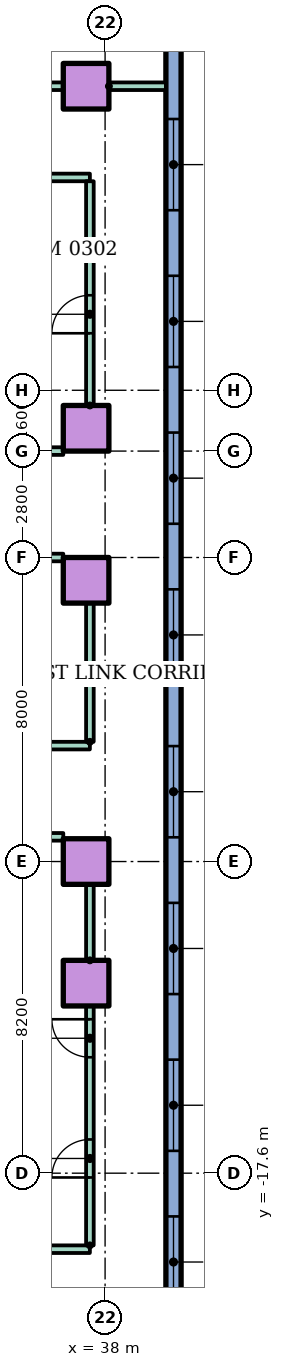
"""IFC4 building model, lengths in metres.
Left out: names, types, materials, properties, quantities, classifications, styles, units other than length and angle.
Written with IfcOpenShell. Run it as: python <this file> out.ifc"""

import sys

from ifc_helpers import new_model, si_unit, direction, frame, frame_2d, origin, origin_2d, place, context, subcontext, project, spatial, rectangle, hollow_rectangle, extrude, element, fill, save


model = new_model("IFC4")
c1 = context("Model", 3, precision=1e-05, world=origin(), true_north=direction((0.0, 1.0)))
c2 = subcontext(c1, "Body", "Model", "MODEL_VIEW")
j1 = project(units=[si_unit("LENGTHUNIT", "METRE"), si_unit("PLANEANGLEUNIT", "RADIAN")], contexts=[c1])
p1 = place(None, origin())
s1 = spatial("IfcSite", under=j1, at=p1, CompositionType="ELEMENT")
p2 = place(p1, origin())
s2 = spatial("IfcBuilding", under=s1, at=p2, CompositionType="ELEMENT")
p3 = place(p2, frame((0.0, 0.0, 14.0)))
s3 = spatial("IfcBuildingStorey", under=s2, at=p3, CompositionType="ELEMENT", Elevation=14.0)
for number, where in (
    (1, (37.5, -12.6, 0.0)),
    (2, (37.5, -9.4, 0.0)),
    (3, (37.5, -2.0, 0.0)),
    (4, (37.5, 2.0, 0.0)),
    (5, (37.5, 11.0, 0.0)),
):
    element("IfcColumn", number, at=place(p3, frame(where)), inside=s3, PredefinedType="COLUMN", context=c2, shape_type="SweptSolid", body=[
        extrude(hollow_rectangle(XDim=1.2, YDim=1.2, WallThickness=0.06, at=origin_2d()), origin(), (0.0, 0.0, 1.0), 4.0),
    ])
p4 = place(p3, frame((39.8, -50.0, 0.0), z_axis=(0.0, 0.0, 1.0), x_axis=(0.0, 1.0, 0.0)))
e6 = element("IfcWall", 6, at=p4, inside=s3, PredefinedType="STANDARD", context=c2, shape_type="SweptSolid", body=[
    extrude(rectangle(XDim=70.0, YDim=0.4, at=frame_2d((35.0, 0.0))), origin(), (0.0, 0.0, 1.0), 3.7),
])
p5 = place(p4, frame((0.75, 0.0, 0.9)))
e7 = element("IfcOpeningElement", 7, at=p5, cuts=e6, PredefinedType="OPENING", context=c2, shape_type="SweptSolid", body=[
    extrude(rectangle(XDim=2.4, YDim=2.1, at=frame_2d((1.2, 1.05))), frame((0.0, 0.21, 0.0), z_axis=(0.0, -1.0, 0.0), x_axis=(1.0, 0.0, 0.0)), (0.0, 0.0, 1.0), 0.42),
])
p6 = place(p4, frame((28.863, 0.0, 0.9)))
e8 = element("IfcOpeningElement", 8, at=p6, cuts=e6, PredefinedType="OPENING", context=c2, shape_type="SweptSolid", body=[
    extrude(rectangle(XDim=2.4, YDim=2.1, at=frame_2d((1.2, 1.05))), frame((0.0, 0.21, 0.0), z_axis=(0.0, -1.0, 0.0), x_axis=(1.0, 0.0, 0.0)), (0.0, 0.0, 1.0), 0.42),
])
p7 = place(p4, frame((32.988, 0.0, 0.9)))
e9 = element("IfcOpeningElement", 9, at=p7, cuts=e6, PredefinedType="OPENING", context=c2, shape_type="SweptSolid", body=[
    extrude(rectangle(XDim=2.4, YDim=2.1, at=frame_2d((1.2, 1.05))), frame((0.0, 0.21, 0.0), z_axis=(0.0, -1.0, 0.0), x_axis=(1.0, 0.0, 0.0)), (0.0, 0.0, 1.0), 0.42),
])
p8 = place(p4, frame((37.113, 0.0, 0.9)))
e10 = element("IfcOpeningElement", 10, at=p8, cuts=e6, PredefinedType="OPENING", context=c2, shape_type="SweptSolid", body=[
    extrude(rectangle(XDim=2.4, YDim=2.1, at=frame_2d((1.2, 1.05))), frame((0.0, 0.21, 0.0), z_axis=(0.0, -1.0, 0.0), x_axis=(1.0, 0.0, 0.0)), (0.0, 0.0, 1.0), 0.42),
])
p9 = place(p4, frame((41.238, 0.0, 0.9)))
e11 = element("IfcOpeningElement", 11, at=p9, cuts=e6, PredefinedType="OPENING", context=c2, shape_type="SweptSolid", body=[
    extrude(rectangle(XDim=2.4, YDim=2.1, at=frame_2d((1.2, 1.05))), frame((0.0, 0.21, 0.0), z_axis=(0.0, -1.0, 0.0), x_axis=(1.0, 0.0, 0.0)), (0.0, 0.0, 1.0), 0.42),
])
p10 = place(p4, frame((45.363, 0.0, 0.9)))
e12 = element("IfcOpeningElement", 12, at=p10, cuts=e6, PredefinedType="OPENING", context=c2, shape_type="SweptSolid", body=[
    extrude(rectangle(XDim=2.4, YDim=2.1, at=frame_2d((1.2, 1.05))), frame((0.0, 0.21, 0.0), z_axis=(0.0, -1.0, 0.0), x_axis=(1.0, 0.0, 0.0)), (0.0, 0.0, 1.0), 0.42),
])
p11 = place(p4, frame((49.488, 0.0, 0.9)))
e13 = element("IfcOpeningElement", 13, at=p11, cuts=e6, PredefinedType="OPENING", context=c2, shape_type="SweptSolid", body=[
    extrude(rectangle(XDim=2.4, YDim=2.1, at=frame_2d((1.2, 1.05))), frame((0.0, 0.21, 0.0), z_axis=(0.0, -1.0, 0.0), x_axis=(1.0, 0.0, 0.0)), (0.0, 0.0, 1.0), 0.42),
])
p12 = place(p4, frame((53.613, 0.0, 0.9)))
e14 = element("IfcOpeningElement", 14, at=p12, cuts=e6, PredefinedType="OPENING", context=c2, shape_type="SweptSolid", body=[
    extrude(rectangle(XDim=2.4, YDim=2.1, at=frame_2d((1.2, 1.05))), frame((0.0, 0.21, 0.0), z_axis=(0.0, -1.0, 0.0), x_axis=(1.0, 0.0, 0.0)), (0.0, 0.0, 1.0), 0.42),
])
p13 = place(p4, frame((57.738, 0.0, 0.9)))
e15 = element("IfcOpeningElement", 15, at=p13, cuts=e6, PredefinedType="OPENING", context=c2, shape_type="SweptSolid", body=[
    extrude(rectangle(XDim=2.4, YDim=2.1, at=frame_2d((1.2, 1.05))), frame((0.0, 0.21, 0.0), z_axis=(0.0, -1.0, 0.0), x_axis=(1.0, 0.0, 0.0)), (0.0, 0.0, 1.0), 0.42),
])
p14 = place(p4, frame((62.05, 0.0, 0.9)))
e16 = element("IfcOpeningElement", 16, at=p14, cuts=e6, PredefinedType="OPENING", context=c2, shape_type="SweptSolid", body=[
    extrude(rectangle(XDim=2.4, YDim=2.1, at=frame_2d((1.2, 1.05))), frame((0.0, 0.21, 0.0), z_axis=(0.0, -1.0, 0.0), x_axis=(1.0, 0.0, 0.0)), (0.0, 0.0, 1.0), 0.42),
])
p15 = place(p4, frame((66.55, 0.0, 0.9)))
e17 = element("IfcOpeningElement", 17, at=p15, cuts=e6, PredefinedType="OPENING", context=c2, shape_type="SweptSolid", body=[
    extrude(rectangle(XDim=2.4, YDim=2.1, at=frame_2d((1.2, 1.05))), frame((0.0, 0.21, 0.0), z_axis=(0.0, -1.0, 0.0), x_axis=(1.0, 0.0, 0.0)), (0.0, 0.0, 1.0), 0.42),
])
p16 = place(p3, frame((-37.6, -19.6, 0.0)))
e18 = element("IfcWall", 18, at=p16, inside=s3, PredefinedType="PARTITIONING", context=c2, shape_type="SweptSolid", body=[
    extrude(rectangle(XDim=75.2, YDim=0.2, at=frame_2d((37.6, 0.0))), origin(), (0.0, 0.0, 1.0), 3.7),
])
p17 = place(p16, frame((2.14, 0.0, 0.0)))
e19 = element("IfcOpeningElement", 19, at=p17, cuts=e18, PredefinedType="OPENING", context=c2, shape_type="SweptSolid", body=[
    extrude(rectangle(XDim=1.0, YDim=2.1, at=frame_2d((0.5, 1.05))), frame((0.0, 0.11, 0.0), z_axis=(0.0, -1.0, 0.0), x_axis=(1.0, 0.0, 0.0)), (0.0, 0.0, 1.0), 0.22),
])
p18 = place(p16, frame((8.86, 0.0, 0.0)))
e20 = element("IfcOpeningElement", 20, at=p18, cuts=e18, PredefinedType="OPENING", context=c2, shape_type="SweptSolid", body=[
    extrude(rectangle(XDim=1.0, YDim=2.1, at=frame_2d((0.5, 1.05))), frame((0.0, 0.11, 0.0), z_axis=(0.0, -1.0, 0.0), x_axis=(1.0, 0.0, 0.0)), (0.0, 0.0, 1.0), 0.22),
])
p19 = place(p16, frame((14.14, 0.0, 0.0)))
e21 = element("IfcOpeningElement", 21, at=p19, cuts=e18, PredefinedType="OPENING", context=c2, shape_type="SweptSolid", body=[
    extrude(rectangle(XDim=1.0, YDim=2.1, at=frame_2d((0.5, 1.05))), frame((0.0, 0.11, 0.0), z_axis=(0.0, -1.0, 0.0), x_axis=(1.0, 0.0, 0.0)), (0.0, 0.0, 1.0), 0.22),
])
p20 = place(p16, frame((20.86, 0.0, 0.0)))
e22 = element("IfcOpeningElement", 22, at=p20, cuts=e18, PredefinedType="OPENING", context=c2, shape_type="SweptSolid", body=[
    extrude(rectangle(XDim=1.0, YDim=2.1, at=frame_2d((0.5, 1.05))), frame((0.0, 0.11, 0.0), z_axis=(0.0, -1.0, 0.0), x_axis=(1.0, 0.0, 0.0)), (0.0, 0.0, 1.0), 0.22),
])
p21 = place(p16, frame((26.14, 0.0, 0.0)))
e23 = element("IfcOpeningElement", 23, at=p21, cuts=e18, PredefinedType="OPENING", context=c2, shape_type="SweptSolid", body=[
    extrude(rectangle(XDim=1.0, YDim=2.1, at=frame_2d((0.5, 1.05))), frame((0.0, 0.11, 0.0), z_axis=(0.0, -1.0, 0.0), x_axis=(1.0, 0.0, 0.0)), (0.0, 0.0, 1.0), 0.22),
])
p22 = place(p16, frame((32.86, 0.0, 0.0)))
e24 = element("IfcOpeningElement", 24, at=p22, cuts=e18, PredefinedType="OPENING", context=c2, shape_type="SweptSolid", body=[
    extrude(rectangle(XDim=1.0, YDim=2.1, at=frame_2d((0.5, 1.05))), frame((0.0, 0.11, 0.0), z_axis=(0.0, -1.0, 0.0), x_axis=(1.0, 0.0, 0.0)), (0.0, 0.0, 1.0), 0.22),
])
p23 = place(p16, frame((39.85, 0.0, 0.0)))
e25 = element("IfcOpeningElement", 25, at=p23, cuts=e18, PredefinedType="OPENING", context=c2, shape_type="SweptSolid", body=[
    extrude(rectangle(XDim=0.9, YDim=2.1, at=frame_2d((0.45, 1.05))), frame((0.0, 0.11, 0.0), z_axis=(0.0, -1.0, 0.0), x_axis=(1.0, 0.0, 0.0)), (0.0, 0.0, 1.0), 0.22),
])
p24 = place(p16, frame((50.1, 0.0, 0.0)))
e26 = element("IfcOpeningElement", 26, at=p24, cuts=e18, PredefinedType="OPENING", context=c2, shape_type="SweptSolid", body=[
    extrude(rectangle(XDim=1.0, YDim=2.1, at=frame_2d((0.5, 1.05))), frame((0.0, 0.11, 0.0), z_axis=(0.0, -1.0, 0.0), x_axis=(1.0, 0.0, 0.0)), (0.0, 0.0, 1.0), 0.22),
])
p25 = place(p16, frame((61.1, 0.0, 0.0)))
e27 = element("IfcOpeningElement", 27, at=p25, cuts=e18, PredefinedType="OPENING", context=c2, shape_type="SweptSolid", body=[
    extrude(rectangle(XDim=1.0, YDim=2.1, at=frame_2d((0.5, 1.05))), frame((0.0, 0.11, 0.0), z_axis=(0.0, -1.0, 0.0), x_axis=(1.0, 0.0, 0.0)), (0.0, 0.0, 1.0), 0.22),
])
p26 = place(p3, frame((-36.9, -8.75, 0.0)))
e28 = element("IfcWall", 28, at=p26, inside=s3, PredefinedType="PARTITIONING", context=c2, shape_type="SweptSolid", body=[
    extrude(rectangle(XDim=73.8, YDim=0.2, at=frame_2d((36.9, 0.0))), origin(), (0.0, 0.0, 1.0), 3.7),
])
p27 = place(p3, frame((-37.6, -6.35, 0.0)))
e29 = element("IfcWall", 29, at=p27, inside=s3, PredefinedType="PARTITIONING", context=c2, shape_type="SweptSolid", body=[
    extrude(rectangle(XDim=75.2, YDim=0.2, at=frame_2d((37.6, 0.0))), origin(), (0.0, 0.0, 1.0), 3.7),
])
p28 = place(p27, frame((4.5, 0.0, 0.0)))
e30 = element("IfcOpeningElement", 30, at=p28, cuts=e29, PredefinedType="OPENING", context=c2, shape_type="SweptSolid", body=[
    extrude(rectangle(XDim=1.0, YDim=2.1, at=frame_2d((0.5, 1.05))), frame((0.0, 0.11, 0.0), z_axis=(0.0, -1.0, 0.0), x_axis=(1.0, 0.0, 0.0)), (0.0, 0.0, 1.0), 0.22),
])
p29 = place(p27, frame((15.5, 0.0, 0.0)))
e31 = element("IfcOpeningElement", 31, at=p29, cuts=e29, PredefinedType="OPENING", context=c2, shape_type="SweptSolid", body=[
    extrude(rectangle(XDim=1.0, YDim=2.1, at=frame_2d((0.5, 1.05))), frame((0.0, 0.11, 0.0), z_axis=(0.0, -1.0, 0.0), x_axis=(1.0, 0.0, 0.0)), (0.0, 0.0, 1.0), 0.22),
])
p30 = place(p27, frame((25.5, 0.0, 0.0)))
e32 = element("IfcOpeningElement", 32, at=p30, cuts=e29, PredefinedType="OPENING", context=c2, shape_type="SweptSolid", body=[
    extrude(rectangle(XDim=1.0, YDim=2.1, at=frame_2d((0.5, 1.05))), frame((0.0, 0.11, 0.0), z_axis=(0.0, -1.0, 0.0), x_axis=(1.0, 0.0, 0.0)), (0.0, 0.0, 1.0), 0.22),
])
p31 = place(p27, frame((34.55, 0.0, 0.0)))
e33 = element("IfcOpeningElement", 33, at=p31, cuts=e29, PredefinedType="OPENING", context=c2, shape_type="SweptSolid", body=[
    extrude(rectangle(XDim=0.9, YDim=2.1, at=frame_2d((0.45, 1.05))), frame((0.0, 0.11, 0.0), z_axis=(0.0, -1.0, 0.0), x_axis=(1.0, 0.0, 0.0)), (0.0, 0.0, 1.0), 0.22),
])
p32 = place(p27, frame((44.604, 0.0, 0.0)))
e34 = element("IfcOpeningElement", 34, at=p32, cuts=e29, PredefinedType="OPENING", context=c2, shape_type="SweptSolid", body=[
    extrude(rectangle(XDim=1.0, YDim=2.1, at=frame_2d((0.5, 1.05))), frame((0.0, 0.11, 0.0), z_axis=(0.0, -1.0, 0.0), x_axis=(1.0, 0.0, 0.0)), (0.0, 0.0, 1.0), 0.22),
])
p33 = place(p27, frame((57.596, 0.0, 0.0)))
e35 = element("IfcOpeningElement", 35, at=p33, cuts=e29, PredefinedType="OPENING", context=c2, shape_type="SweptSolid", body=[
    extrude(rectangle(XDim=1.0, YDim=2.1, at=frame_2d((0.5, 1.05))), frame((0.0, 0.11, 0.0), z_axis=(0.0, -1.0, 0.0), x_axis=(1.0, 0.0, 0.0)), (0.0, 0.0, 1.0), 0.22),
])
p34 = place(p27, frame((68.7, 0.0, 0.0)))
e36 = element("IfcOpeningElement", 36, at=p34, cuts=e29, PredefinedType="OPENING", context=c2, shape_type="SweptSolid", body=[
    extrude(rectangle(XDim=1.0, YDim=2.1, at=frame_2d((0.5, 1.05))), frame((0.0, 0.11, 0.0), z_axis=(0.0, -1.0, 0.0), x_axis=(1.0, 0.0, 0.0)), (0.0, 0.0, 1.0), 0.22),
])
p35 = place(p3, frame((14.0, -1.4, 0.0)))
e37 = element("IfcWall", 37, at=p35, inside=s3, PredefinedType="PARTITIONING", context=c2, shape_type="SweptSolid", body=[
    extrude(rectangle(XDim=22.9, YDim=0.2, at=frame_2d((11.45, 0.0))), origin(), (0.0, 0.0, 1.0), 3.7),
])
p36 = place(p3, frame((16.3, 1.4, 0.0)))
e38 = element("IfcWall", 38, at=p36, inside=s3, PredefinedType="PARTITIONING", context=c2, shape_type="SweptSolid", body=[
    extrude(rectangle(XDim=20.6, YDim=0.2, at=frame_2d((10.3, 0.0))), origin(), (0.0, 0.0, 1.0), 3.7),
])
p37 = place(p36, frame((2.35, 0.0, 0.0)))
e39 = element("IfcOpeningElement", 39, at=p37, cuts=e38, PredefinedType="OPENING", context=c2, shape_type="SweptSolid", body=[
    extrude(rectangle(XDim=1.0, YDim=2.1, at=frame_2d((0.5, 1.05))), frame((0.0, 0.11, 0.0), z_axis=(0.0, -1.0, 0.0), x_axis=(1.0, 0.0, 0.0)), (0.0, 0.0, 1.0), 0.22),
])
p38 = place(p36, frame((7.1, 0.0, 0.0)))
e40 = element("IfcOpeningElement", 40, at=p38, cuts=e38, PredefinedType="OPENING", context=c2, shape_type="SweptSolid", body=[
    extrude(rectangle(XDim=1.0, YDim=2.1, at=frame_2d((0.5, 1.05))), frame((0.0, 0.11, 0.0), z_axis=(0.0, -1.0, 0.0), x_axis=(1.0, 0.0, 0.0)), (0.0, 0.0, 1.0), 0.22),
])
p39 = place(p36, frame((10.8, 0.0, 0.0)))
e41 = element("IfcOpeningElement", 41, at=p39, cuts=e38, PredefinedType="OPENING", context=c2, shape_type="SweptSolid", body=[
    extrude(rectangle(XDim=1.0, YDim=2.1, at=frame_2d((0.5, 1.05))), frame((0.0, 0.11, 0.0), z_axis=(0.0, -1.0, 0.0), x_axis=(1.0, 0.0, 0.0)), (0.0, 0.0, 1.0), 0.22),
])
p40 = place(p36, frame((13.15, 0.0, 0.0)))
e42 = element("IfcOpeningElement", 42, at=p40, cuts=e38, PredefinedType="OPENING", context=c2, shape_type="SweptSolid", body=[
    extrude(rectangle(XDim=0.9, YDim=2.1, at=frame_2d((0.45, 1.05))), frame((0.0, 0.11, 0.0), z_axis=(0.0, -1.0, 0.0), x_axis=(1.0, 0.0, 0.0)), (0.0, 0.0, 1.0), 0.22),
])
p41 = place(p3, frame((16.3, 8.6, 0.0)))
e43 = element("IfcWall", 43, at=p41, inside=s3, PredefinedType="PARTITIONING", context=c2, shape_type="SweptSolid", body=[
    extrude(rectangle(XDim=21.3, YDim=0.2, at=frame_2d((10.65, 0.0))), origin(), (0.0, 0.0, 1.0), 3.7),
])
p42 = place(p3, frame((34.5, 11.0, 0.0)))
e44 = element("IfcWall", 44, at=p42, inside=s3, PredefinedType="PARTITIONING", context=c2, shape_type="SweptSolid", body=[
    extrude(rectangle(XDim=2.4, YDim=0.2, at=frame_2d((1.2, 0.0))), origin(), (0.0, 0.0, 1.0), 3.7),
])
p43 = place(p3, frame((38.1, 11.0, 0.0)))
e45 = element("IfcWall", 45, at=p43, inside=s3, PredefinedType="PARTITIONING", context=c2, shape_type="SweptSolid", body=[
    extrude(rectangle(XDim=1.5, YDim=0.2, at=frame_2d((0.75, 0.0))), origin(), (0.0, 0.0, 1.0), 3.7),
])
p44 = place(p3, frame((37.6, -19.5, 0.0), z_axis=(0.0, 0.0, 1.0), x_axis=(0.0, 1.0, 0.0)))
e46 = element("IfcWall", 46, at=p44, inside=s3, PredefinedType="PARTITIONING", context=c2, shape_type="SweptSolid", body=[
    extrude(rectangle(XDim=6.3, YDim=0.2, at=frame_2d((3.15, 0.0))), origin(), (0.0, 0.0, 1.0), 3.7),
])
p45 = place(p44, frame((1.787, 0.0, 0.0)))
e47 = element("IfcOpeningElement", 47, at=p45, cuts=e46, PredefinedType="OPENING", context=c2, shape_type="SweptSolid", body=[
    extrude(rectangle(XDim=1.0, YDim=2.1, at=frame_2d((0.5, 1.05))), frame((0.0, 0.11, 0.0), z_axis=(0.0, -1.0, 0.0), x_axis=(1.0, 0.0, 0.0)), (0.0, 0.0, 1.0), 0.22),
])
p46 = place(p44, frame((4.95, 0.0, 0.0)))
e48 = element("IfcOpeningElement", 48, at=p46, cuts=e46, PredefinedType="OPENING", context=c2, shape_type="SweptSolid", body=[
    extrude(rectangle(XDim=1.0, YDim=2.1, at=frame_2d((0.5, 1.05))), frame((0.0, 0.11, 0.0), z_axis=(0.0, -1.0, 0.0), x_axis=(1.0, 0.0, 0.0)), (0.0, 0.0, 1.0), 0.22),
])
p47 = place(p3, frame((37.6, -12.0, 0.0), z_axis=(0.0, 0.0, 1.0), x_axis=(0.0, 1.0, 0.0)))
e49 = element("IfcWall", 49, at=p47, inside=s3, PredefinedType="PARTITIONING", context=c2, shape_type="SweptSolid", body=[
    extrude(rectangle(XDim=2.0, YDim=0.2, at=frame_2d((1.0, 0.0))), origin(), (0.0, 0.0, 1.0), 3.7),
])
p48 = place(p3, frame((37.6, -6.25, 0.0), z_axis=(0.0, 0.0, 1.0), x_axis=(0.0, 1.0, 0.0)))
e50 = element("IfcWall", 50, at=p48, inside=s3, PredefinedType="PARTITIONING", context=c2, shape_type="SweptSolid", body=[
    extrude(rectangle(XDim=3.65, YDim=0.2, at=frame_2d((1.825, 0.0))), origin(), (0.0, 0.0, 1.0), 3.7),
])
p49 = place(p3, frame((37.6, 2.6, 0.0), z_axis=(0.0, 0.0, 1.0), x_axis=(0.0, 1.0, 0.0)))
e51 = element("IfcWall", 51, at=p49, inside=s3, PredefinedType="PARTITIONING", context=c2, shape_type="SweptSolid", body=[
    extrude(rectangle(XDim=5.9, YDim=0.2, at=frame_2d((2.95, 0.0))), origin(), (0.0, 0.0, 1.0), 3.7),
])
p50 = place(p49, frame((1.9, 0.0, 0.0)))
e52 = element("IfcOpeningElement", 52, at=p50, cuts=e51, PredefinedType="OPENING", context=c2, shape_type="SweptSolid", body=[
    extrude(rectangle(XDim=1.0, YDim=2.1, at=frame_2d((0.5, 1.05))), frame((0.0, 0.11, 0.0), z_axis=(0.0, -1.0, 0.0), x_axis=(1.0, 0.0, 0.0)), (0.0, 0.0, 1.0), 0.22),
])
p51 = place(p6, origin())
e53 = element("IfcWindow", 53, at=p51, inside=s3, PartitioningType="SINGLE_PANEL", PredefinedType="WINDOW", context=c2, shape_type="SweptSolid", body=[
    extrude(rectangle(XDim=2.4, YDim=2.1, at=frame_2d((1.2, 1.05))), frame((0.0, 0.03, 0.0), z_axis=(0.0, -1.0, 0.0), x_axis=(1.0, 0.0, 0.0)), (0.0, 0.0, 1.0), 0.06),
])
fill(e8, e53)
p52 = place(p7, origin())
e54 = element("IfcWindow", 54, at=p52, inside=s3, PartitioningType="SINGLE_PANEL", PredefinedType="WINDOW", context=c2, shape_type="SweptSolid", body=[
    extrude(rectangle(XDim=2.4, YDim=2.1, at=frame_2d((1.2, 1.05))), frame((0.0, 0.03, 0.0), z_axis=(0.0, -1.0, 0.0), x_axis=(1.0, 0.0, 0.0)), (0.0, 0.0, 1.0), 0.06),
])
fill(e9, e54)
p53 = place(p8, origin())
e55 = element("IfcWindow", 55, at=p53, inside=s3, PartitioningType="SINGLE_PANEL", PredefinedType="WINDOW", context=c2, shape_type="SweptSolid", body=[
    extrude(rectangle(XDim=2.4, YDim=2.1, at=frame_2d((1.2, 1.05))), frame((0.0, 0.03, 0.0), z_axis=(0.0, -1.0, 0.0), x_axis=(1.0, 0.0, 0.0)), (0.0, 0.0, 1.0), 0.06),
])
fill(e10, e55)
p54 = place(p9, origin())
e56 = element("IfcWindow", 56, at=p54, inside=s3, PartitioningType="SINGLE_PANEL", PredefinedType="WINDOW", context=c2, shape_type="SweptSolid", body=[
    extrude(rectangle(XDim=2.4, YDim=2.1, at=frame_2d((1.2, 1.05))), frame((0.0, 0.03, 0.0), z_axis=(0.0, -1.0, 0.0), x_axis=(1.0, 0.0, 0.0)), (0.0, 0.0, 1.0), 0.06),
])
fill(e11, e56)
p55 = place(p10, origin())
e57 = element("IfcWindow", 57, at=p55, inside=s3, PartitioningType="SINGLE_PANEL", PredefinedType="WINDOW", context=c2, shape_type="SweptSolid", body=[
    extrude(rectangle(XDim=2.4, YDim=2.1, at=frame_2d((1.2, 1.05))), frame((0.0, 0.03, 0.0), z_axis=(0.0, -1.0, 0.0), x_axis=(1.0, 0.0, 0.0)), (0.0, 0.0, 1.0), 0.06),
])
fill(e12, e57)
p56 = place(p11, origin())
e58 = element("IfcWindow", 58, at=p56, inside=s3, PartitioningType="SINGLE_PANEL", PredefinedType="WINDOW", context=c2, shape_type="SweptSolid", body=[
    extrude(rectangle(XDim=2.4, YDim=2.1, at=frame_2d((1.2, 1.05))), frame((0.0, 0.03, 0.0), z_axis=(0.0, -1.0, 0.0), x_axis=(1.0, 0.0, 0.0)), (0.0, 0.0, 1.0), 0.06),
])
fill(e13, e58)
p57 = place(p12, origin())
e59 = element("IfcWindow", 59, at=p57, inside=s3, PartitioningType="SINGLE_PANEL", PredefinedType="WINDOW", context=c2, shape_type="SweptSolid", body=[
    extrude(rectangle(XDim=2.4, YDim=2.1, at=frame_2d((1.2, 1.05))), frame((0.0, 0.03, 0.0), z_axis=(0.0, -1.0, 0.0), x_axis=(1.0, 0.0, 0.0)), (0.0, 0.0, 1.0), 0.06),
])
fill(e14, e59)
p58 = place(p13, origin())
e60 = element("IfcWindow", 60, at=p58, inside=s3, PartitioningType="SINGLE_PANEL", PredefinedType="WINDOW", context=c2, shape_type="SweptSolid", body=[
    extrude(rectangle(XDim=2.4, YDim=2.1, at=frame_2d((1.2, 1.05))), frame((0.0, 0.03, 0.0), z_axis=(0.0, -1.0, 0.0), x_axis=(1.0, 0.0, 0.0)), (0.0, 0.0, 1.0), 0.06),
])
fill(e15, e60)
p59 = place(p45, origin())
e61 = element("IfcDoor", 61, at=p59, inside=s3, OperationType="SINGLE_SWING_LEFT", PredefinedType="DOOR", context=c2, shape_type="SweptSolid", body=[
    extrude(rectangle(XDim=1.0, YDim=2.1, at=frame_2d((0.5, 1.05))), frame((0.0, 0.025, 0.0), z_axis=(0.0, -1.0, 0.0), x_axis=(1.0, 0.0, 0.0)), (0.0, 0.0, 1.0), 0.05),
])
fill(e47, e61)
p60 = place(p46, origin())
e62 = element("IfcDoor", 62, at=p60, inside=s3, OperationType="SINGLE_SWING_RIGHT", PredefinedType="DOOR", context=c2, shape_type="SweptSolid", body=[
    extrude(rectangle(XDim=1.0, YDim=2.1, at=frame_2d((0.5, 1.05))), frame((0.0, 0.025, 0.0), z_axis=(0.0, -1.0, 0.0), x_axis=(1.0, 0.0, 0.0)), (0.0, 0.0, 1.0), 0.05),
])
fill(e48, e62)
p61 = place(p50, origin())
e63 = element("IfcDoor", 63, at=p61, inside=s3, OperationType="SINGLE_SWING_LEFT", PredefinedType="DOOR", context=c2, shape_type="SweptSolid", body=[
    extrude(rectangle(XDim=1.0, YDim=2.1, at=frame_2d((0.5, 1.05))), frame((0.0, 0.025, 0.0), z_axis=(0.0, -1.0, 0.0), x_axis=(1.0, 0.0, 0.0)), (0.0, 0.0, 1.0), 0.05),
])
fill(e52, e63)
save(model, sys.argv[1])
